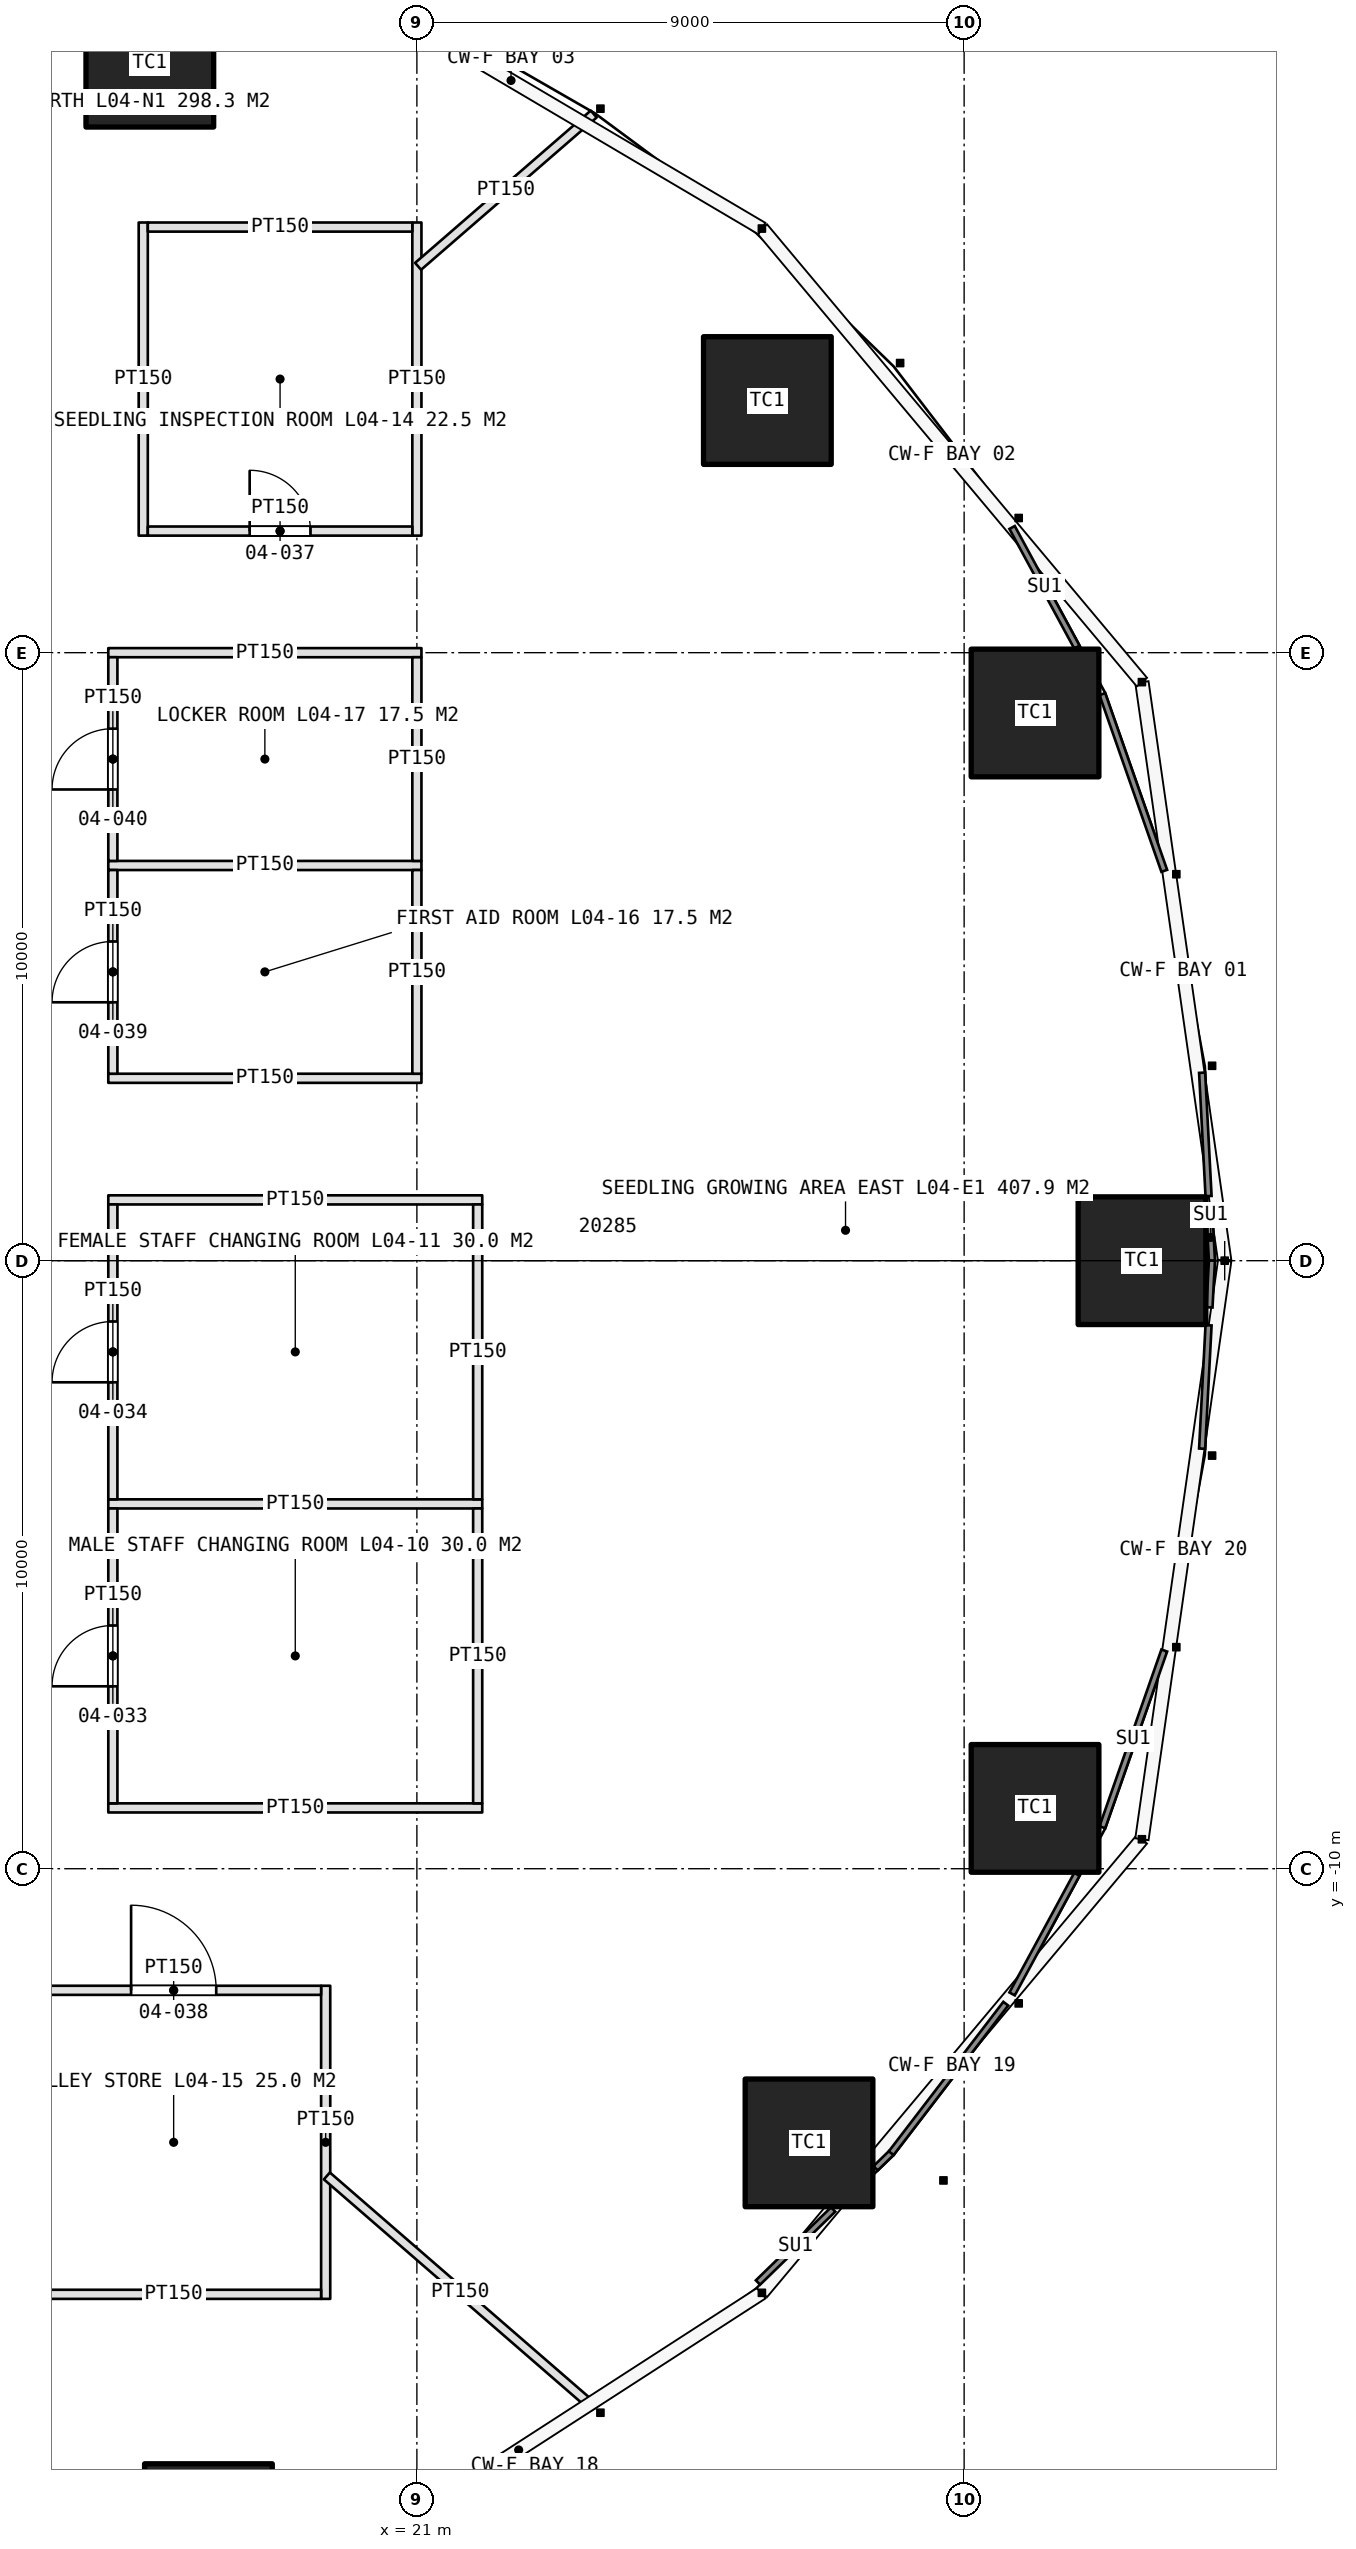
"""IFC4 building model, lengths in metres.
Left out: names, types, materials, properties, quantities, classifications, styles, units other than length and angle.
Written with IfcOpenShell. Run it as: python <this file> out.ifc"""

import sys

from ifc_helpers import new_model, si_unit, direction, frame, frame_2d, origin, origin_2d, place, context, subcontext, project, spatial, rectangle, extrude, element, fill, save


model = new_model("IFC4")
c1 = context("Model", 3, precision=1e-05, world=origin(), true_north=direction((0.0, 1.0)))
c2 = subcontext(c1, "Body", "Model", "MODEL_VIEW")
j1 = project(units=[si_unit("LENGTHUNIT", "METRE"), si_unit("PLANEANGLEUNIT", "RADIAN")], contexts=[c1])
p1 = place(None, origin())
s1 = spatial("IfcSite", under=j1, at=p1, CompositionType="ELEMENT")
p2 = place(p1, origin())
s2 = spatial("IfcBuilding", under=s1, at=p2, CompositionType="ELEMENT")
p3 = place(p2, frame((0.0, 0.0, 20.0)))
s3 = spatial("IfcBuildingStorey", under=s2, at=p3, CompositionType="ELEMENT", Elevation=20.0)
for number, where, z_axis, x_axis in (
    (1, (32.925, 0.0, 0.0), (0.0, 0.0, 1.0), (1.0, 0.0, 0.0)),
    (2, (31.166, 9.008, 0.0), (0.0, 0.0, 1.0), (1.0, 0.0, 0.0)),
    (3, (26.764, 14.147, 0.0), (0.0, 0.0, 1.0), (1.0, 0.0, 0.0)),
    (4, (16.608, 19.695, 0.0), (0.0, 0.0, 1.0), (1.0, 0.0, 0.0)),
    (5, (17.572, -20.837, 0.0), (0.0, 0.0, 1.0), (1.0, 0.0, 0.0)),
    (6, (27.449, -14.509, 0.0), (0.0, 0.0, 1.0), (1.0, 0.0, 0.0)),
    (7, (31.166, -9.008, 0.0), (0.0, 0.0, 1.0), (1.0, 0.0, 0.0)),
):
    element("IfcColumn", number, at=place(p3, frame(where, z_axis=z_axis, x_axis=x_axis)), inside=s3, PredefinedType="COLUMN", context=c2, shape_type="SweptSolid", body=[
        extrude(rectangle(XDim=2.1, YDim=2.1, at=origin_2d()), origin(), (0.0, 0.0, 1.0), 5.0),
    ])
for number, where, z_axis, x_axis in (
    (8, (15.925, -9.0, 0.0), (0.0, 0.0, 1.0), (1.0, 0.0, 0.0)),
    (9, (15.925, -4.0, 0.0), (0.0, 0.0, 1.0), (1.0, 0.0, 0.0)),
    (10, (15.925, 1.0, 0.0), (0.0, 0.0, 1.0), (1.0, 0.0, 0.0)),
):
    element("IfcWall", number, at=place(p3, frame(where, z_axis=z_axis, x_axis=x_axis)), inside=s3, PredefinedType="PARTITIONING", context=c2, shape_type="SweptSolid", body=[
        extrude(rectangle(XDim=6.15, YDim=0.15, at=frame_2d((3.075, 0.0))), origin(), (0.0, 0.0, 1.0), 3.6),
    ])
p4 = place(p3, frame((16.0, -8.925, 0.0), z_axis=(0.0, 0.0, 1.0), x_axis=(0.0, 1.0, 0.0)))
e11 = element("IfcWall", 11, at=p4, inside=s3, PredefinedType="PARTITIONING", context=c2, shape_type="SweptSolid", body=[
    extrude(rectangle(XDim=4.85, YDim=0.15, at=frame_2d((2.425, 0.0))), origin(), (0.0, 0.0, 1.0), 3.6),
])
p5 = place(p4, frame((1.925, 0.0, 0.0)))
e12 = element("IfcOpeningElement", 12, at=p5, cuts=e11, PredefinedType="OPENING", context=c2, shape_type="SweptSolid", body=[
    extrude(rectangle(XDim=1.0, YDim=2.2, at=frame_2d((0.5, 1.1))), frame((0.0, 0.085, 0.0), z_axis=(0.0, -1.0, 0.0), x_axis=(1.0, 0.0, 0.0)), (0.0, 0.0, 1.0), 0.17),
])
p6 = place(p3, frame((22.0, -8.925, 0.0), z_axis=(0.0, 0.0, 1.0), x_axis=(0.0, 1.0, 0.0)))
e13 = element("IfcWall", 13, at=p6, inside=s3, PredefinedType="PARTITIONING", context=c2, shape_type="SweptSolid", body=[
    extrude(rectangle(XDim=4.85, YDim=0.15, at=frame_2d((2.425, 0.0))), origin(), (0.0, 0.0, 1.0), 3.6),
])
p7 = place(p3, frame((16.0, -3.925, 0.0), z_axis=(0.0, 0.0, 1.0), x_axis=(0.0, 1.0, 0.0)))
e14 = element("IfcWall", 14, at=p7, inside=s3, PredefinedType="PARTITIONING", context=c2, shape_type="SweptSolid", body=[
    extrude(rectangle(XDim=4.85, YDim=0.15, at=frame_2d((2.425, 0.0))), origin(), (0.0, 0.0, 1.0), 3.6),
])
p8 = place(p7, frame((1.925, 0.0, 0.0)))
e15 = element("IfcOpeningElement", 15, at=p8, cuts=e14, PredefinedType="OPENING", context=c2, shape_type="SweptSolid", body=[
    extrude(rectangle(XDim=1.0, YDim=2.2, at=frame_2d((0.5, 1.1))), frame((0.0, 0.085, 0.0), z_axis=(0.0, -1.0, 0.0), x_axis=(1.0, 0.0, 0.0)), (0.0, 0.0, 1.0), 0.17),
])
p9 = place(p3, frame((22.0, -3.925, 0.0), z_axis=(0.0, 0.0, 1.0), x_axis=(0.0, 1.0, 0.0)))
e16 = element("IfcWall", 16, at=p9, inside=s3, PredefinedType="PARTITIONING", context=c2, shape_type="SweptSolid", body=[
    extrude(rectangle(XDim=4.85, YDim=0.15, at=frame_2d((2.425, 0.0))), origin(), (0.0, 0.0, 1.0), 3.6),
])
for number, where, z_axis, x_axis in (
    (17, (16.5, 11.925, 0.0), (0.0, 0.0, 1.0), (0.0, 1.0, 0.0)),
    (18, (21.0, 11.925, 0.0), (0.0, 0.0, 1.0), (0.0, 1.0, 0.0)),
):
    element("IfcWall", number, at=place(p3, frame(where, z_axis=z_axis, x_axis=x_axis)), inside=s3, PredefinedType="PARTITIONING", context=c2, shape_type="SweptSolid", body=[
        extrude(rectangle(XDim=5.15, YDim=0.15, at=frame_2d((2.575, 0.0))), origin(), (0.0, 0.0, 1.0), 3.6),
    ])
p10 = place(p3, frame((16.575, 12.0, 0.0), z_axis=(0.0, 0.0, 1.0), x_axis=(1.0, 0.0, 0.0)))
e19 = element("IfcWall", 19, at=p10, inside=s3, PredefinedType="PARTITIONING", context=c2, shape_type="SweptSolid", body=[
    extrude(rectangle(XDim=4.35, YDim=0.15, at=frame_2d((2.175, 0.0))), origin(), (0.0, 0.0, 1.0), 3.6),
])
p11 = place(p10, frame((1.675, 0.0, 0.0)))
e20 = element("IfcOpeningElement", 20, at=p11, cuts=e19, PredefinedType="OPENING", context=c2, shape_type="SweptSolid", body=[
    extrude(rectangle(XDim=1.0, YDim=2.2, at=frame_2d((0.5, 1.1))), frame((0.0, 0.085, 0.0), z_axis=(0.0, -1.0, 0.0), x_axis=(1.0, 0.0, 0.0)), (0.0, 0.0, 1.0), 0.17),
])
p12 = place(p3, frame((16.575, 17.0, 0.0), z_axis=(0.0, 0.0, 1.0), x_axis=(1.0, 0.0, 0.0)))
e21 = element("IfcWall", 21, at=p12, inside=s3, PredefinedType="PARTITIONING", context=c2, shape_type="SweptSolid", body=[
    extrude(rectangle(XDim=4.35, YDim=0.15, at=frame_2d((2.175, 0.0))), origin(), (0.0, 0.0, 1.0), 3.6),
])
p13 = place(p3, frame((19.5, -11.925, 0.0), z_axis=(0.0, 0.0, 1.0), x_axis=(0.0, -1.0, 0.0)))
e22 = element("IfcWall", 22, at=p13, inside=s3, PredefinedType="PARTITIONING", context=c2, shape_type="SweptSolid", body=[
    extrude(rectangle(XDim=5.15, YDim=0.15, at=frame_2d((2.575, 0.0))), origin(), (0.0, 0.0, 1.0), 3.6),
])
p14 = place(p3, frame((14.575, -12.0, 0.0), z_axis=(0.0, 0.0, 1.0), x_axis=(1.0, 0.0, 0.0)))
e23 = element("IfcWall", 23, at=p14, inside=s3, PredefinedType="PARTITIONING", context=c2, shape_type="SweptSolid", body=[
    extrude(rectangle(XDim=4.85, YDim=0.15, at=frame_2d((2.425, 0.0))), origin(), (0.0, 0.0, 1.0), 3.6),
])
p15 = place(p14, frame((1.725, 0.0, 0.0)))
e24 = element("IfcOpeningElement", 24, at=p15, cuts=e23, PredefinedType="OPENING", context=c2, shape_type="SweptSolid", body=[
    extrude(rectangle(XDim=1.4, YDim=2.4, at=frame_2d((0.7, 1.2))), frame((0.0, 0.085, 0.0), z_axis=(0.0, -1.0, 0.0), x_axis=(1.0, 0.0, 0.0)), (0.0, 0.0, 1.0), 0.17),
])
p16 = place(p3, frame((14.575, -17.0, 0.0), z_axis=(0.0, 0.0, 1.0), x_axis=(1.0, 0.0, 0.0)))
e25 = element("IfcWall", 25, at=p16, inside=s3, PredefinedType="PARTITIONING", context=c2, shape_type="SweptSolid", body=[
    extrude(rectangle(XDim=4.85, YDim=0.15, at=frame_2d((2.425, 0.0))), origin(), (0.0, 0.0, 1.0), 3.6),
])
for number, where, z_axis, x_axis in (
    (26, (15.925, 3.0, 0.0), (0.0, 0.0, 1.0), (1.0, 0.0, 0.0)),
    (27, (15.925, 6.5, 0.0), (0.0, 0.0, 1.0), (1.0, 0.0, 0.0)),
    (28, (15.925, 10.0, 0.0), (0.0, 0.0, 1.0), (1.0, 0.0, 0.0)),
):
    element("IfcWall", number, at=place(p3, frame(where, z_axis=z_axis, x_axis=x_axis)), inside=s3, PredefinedType="PARTITIONING", context=c2, shape_type="SweptSolid", body=[
        extrude(rectangle(XDim=5.15, YDim=0.15, at=frame_2d((2.575, 0.0))), origin(), (0.0, 0.0, 1.0), 3.6),
    ])
p17 = place(p3, frame((16.0, 3.075, 0.0), z_axis=(0.0, 0.0, 1.0), x_axis=(0.0, 1.0, 0.0)))
e29 = element("IfcWall", 29, at=p17, inside=s3, PredefinedType="PARTITIONING", context=c2, shape_type="SweptSolid", body=[
    extrude(rectangle(XDim=3.35, YDim=0.15, at=frame_2d((1.675, 0.0))), origin(), (0.0, 0.0, 1.0), 3.6),
])
p18 = place(p17, frame((1.175, 0.0, 0.0)))
e30 = element("IfcOpeningElement", 30, at=p18, cuts=e29, PredefinedType="OPENING", context=c2, shape_type="SweptSolid", body=[
    extrude(rectangle(XDim=1.0, YDim=2.2, at=frame_2d((0.5, 1.1))), frame((0.0, 0.085, 0.0), z_axis=(0.0, -1.0, 0.0), x_axis=(1.0, 0.0, 0.0)), (0.0, 0.0, 1.0), 0.17),
])
p19 = place(p3, frame((21.0, 3.075, 0.0), z_axis=(0.0, 0.0, 1.0), x_axis=(0.0, 1.0, 0.0)))
e31 = element("IfcWall", 31, at=p19, inside=s3, PredefinedType="PARTITIONING", context=c2, shape_type="SweptSolid", body=[
    extrude(rectangle(XDim=3.35, YDim=0.15, at=frame_2d((1.675, 0.0))), origin(), (0.0, 0.0, 1.0), 3.6),
])
p20 = place(p3, frame((16.0, 6.575, 0.0), z_axis=(0.0, 0.0, 1.0), x_axis=(0.0, 1.0, 0.0)))
e32 = element("IfcWall", 32, at=p20, inside=s3, PredefinedType="PARTITIONING", context=c2, shape_type="SweptSolid", body=[
    extrude(rectangle(XDim=3.35, YDim=0.15, at=frame_2d((1.675, 0.0))), origin(), (0.0, 0.0, 1.0), 3.6),
])
p21 = place(p20, frame((1.175, 0.0, 0.0)))
e33 = element("IfcOpeningElement", 33, at=p21, cuts=e32, PredefinedType="OPENING", context=c2, shape_type="SweptSolid", body=[
    extrude(rectangle(XDim=1.0, YDim=2.2, at=frame_2d((0.5, 1.1))), frame((0.0, 0.085, 0.0), z_axis=(0.0, -1.0, 0.0), x_axis=(1.0, 0.0, 0.0)), (0.0, 0.0, 1.0), 0.17),
])
p22 = place(p3, frame((21.0, 6.575, 0.0), z_axis=(0.0, 0.0, 1.0), x_axis=(0.0, 1.0, 0.0)))
e34 = element("IfcWall", 34, at=p22, inside=s3, PredefinedType="PARTITIONING", context=c2, shape_type="SweptSolid", body=[
    extrude(rectangle(XDim=3.35, YDim=0.15, at=frame_2d((1.675, 0.0))), origin(), (0.0, 0.0, 1.0), 3.6),
])
p23 = place(p3, frame((19.52, -15.053, 0.0), z_axis=(0.0, 0.0, 1.0), x_axis=(0.755428315431, -0.655231302858, 0.0)))
e35 = element("IfcWall", 35, at=p23, inside=s3, PredefinedType="PARTITIONING", context=c2, shape_type="SweptSolid", body=[
    extrude(rectangle(XDim=5.809, YDim=0.15, at=frame_2d((2.904, 0.0))), origin(), (0.0, 0.0, 1.0), 3.6),
])
p24 = place(p3, frame((21.02, 16.354, 0.0), z_axis=(0.0, 0.0, 1.0), x_axis=(0.755425653008, 0.655234372402, 0.0)))
e36 = element("IfcWall", 36, at=p24, inside=s3, PredefinedType="PARTITIONING", context=c2, shape_type="SweptSolid", body=[
    extrude(rectangle(XDim=3.823, YDim=0.15, at=frame_2d((1.912, 0.0))), origin(), (0.0, 0.0, 1.0), 3.6),
])
p25 = place(p5, origin())
e37 = element("IfcDoor", 37, at=p25, inside=s3, OperationType="SINGLE_SWING_LEFT", PredefinedType="DOOR", context=c2, shape_type="SweptSolid", body=[
    extrude(rectangle(XDim=1.0, YDim=2.2, at=frame_2d((0.5, 1.1))), frame((0.0, 0.025, 0.0), z_axis=(0.0, -1.0, 0.0), x_axis=(1.0, 0.0, 0.0)), (0.0, 0.0, 1.0), 0.05),
])
fill(e12, e37)
p26 = place(p8, origin())
e38 = element("IfcDoor", 38, at=p26, inside=s3, OperationType="SINGLE_SWING_LEFT", PredefinedType="DOOR", context=c2, shape_type="SweptSolid", body=[
    extrude(rectangle(XDim=1.0, YDim=2.2, at=frame_2d((0.5, 1.1))), frame((0.0, 0.025, 0.0), z_axis=(0.0, -1.0, 0.0), x_axis=(1.0, 0.0, 0.0)), (0.0, 0.0, 1.0), 0.05),
])
fill(e15, e38)
p27 = place(p11, origin())
e39 = element("IfcDoor", 39, at=p27, inside=s3, OperationType="SINGLE_SWING_LEFT", PredefinedType="DOOR", context=c2, shape_type="SweptSolid", body=[
    extrude(rectangle(XDim=1.0, YDim=2.2, at=frame_2d((0.5, 1.1))), frame((0.0, 0.025, 0.0), z_axis=(0.0, -1.0, 0.0), x_axis=(1.0, 0.0, 0.0)), (0.0, 0.0, 1.0), 0.05),
])
fill(e20, e39)
p28 = place(p15, origin())
e40 = element("IfcDoor", 40, at=p28, inside=s3, OperationType="DOUBLE_DOOR_DOUBLE_SWING", PredefinedType="DOOR", context=c2, shape_type="SweptSolid", body=[
    extrude(rectangle(XDim=1.4, YDim=2.4, at=frame_2d((0.7, 1.2))), frame((0.0, 0.025, 0.0), z_axis=(0.0, -1.0, 0.0), x_axis=(1.0, 0.0, 0.0)), (0.0, 0.0, 1.0), 0.05),
])
fill(e24, e40)
p29 = place(p18, origin())
e41 = element("IfcDoor", 41, at=p29, inside=s3, OperationType="SINGLE_SWING_LEFT", PredefinedType="DOOR", context=c2, shape_type="SweptSolid", body=[
    extrude(rectangle(XDim=1.0, YDim=2.2, at=frame_2d((0.5, 1.1))), frame((0.0, 0.025, 0.0), z_axis=(0.0, -1.0, 0.0), x_axis=(1.0, 0.0, 0.0)), (0.0, 0.0, 1.0), 0.05),
])
fill(e30, e41)
p30 = place(p21, origin())
e42 = element("IfcDoor", 42, at=p30, inside=s3, OperationType="SINGLE_SWING_LEFT", PredefinedType="DOOR", context=c2, shape_type="SweptSolid", body=[
    extrude(rectangle(XDim=1.0, YDim=2.2, at=frame_2d((0.5, 1.1))), frame((0.0, 0.025, 0.0), z_axis=(0.0, -1.0, 0.0), x_axis=(1.0, 0.0, 0.0)), (0.0, 0.0, 1.0), 0.05),
])
fill(e33, e42)
save(model, sys.argv[1])
